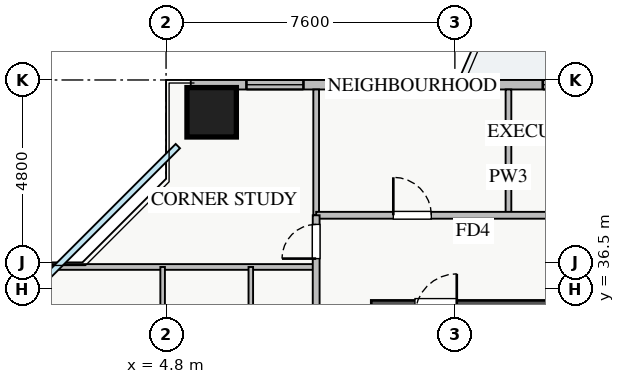
"""IFC4 building model, lengths in metres.
Left out: names, types, materials, properties, quantities, classifications, styles, units other than length and angle.
Written with IfcOpenShell. Run it as: python <this file> out.ifc"""

import sys

from ifc_helpers import new_model, si_unit, direction, frame, frame_2d, origin, origin_2d, place, context, subcontext, project, spatial, rectangle, extrude, source, transform, mapped, element, fill, save


model = new_model("IFC4")
c1 = context("Model", 3, precision=1e-05, world=origin(), true_north=direction((0.0, 1.0)))
c2 = subcontext(c1, "Body", "Model", "MODEL_VIEW")
j1 = project(units=[si_unit("LENGTHUNIT", "METRE"), si_unit("PLANEANGLEUNIT", "RADIAN")], contexts=[c1])
p1 = place(None, origin())
s1 = spatial("IfcSite", under=j1, at=p1, CompositionType="ELEMENT")
p2 = place(p1, origin())
s2 = spatial("IfcBuilding", under=s1, at=p2, CompositionType="ELEMENT")
p3 = place(p2, frame((0.0, 0.0, 60.0)))
s3 = spatial("IfcBuildingStorey", under=s2, at=p3, CompositionType="ELEMENT", Elevation=60.0)
p4 = place(p3, frame((10.2, 35.8, 0.0), z_axis=(0.0, 0.0, 1.0), x_axis=(1.0, 0.0, 0.0)))
e1 = element("IfcWall", 1, at=p4, inside=s3, PredefinedType="SHEAR", context=c2, shape_type="SweptSolid", body=[
    extrude(rectangle(XDim=17.6, YDim=0.8, at=frame_2d((8.8, 0.0))), origin(), (0.0, 0.0, 1.0), 3.25),
])
p5 = place(p4, frame((1.15, 0.0, 0.0)))
e2 = element("IfcOpeningElement", 2, at=p5, cuts=e1, PredefinedType="OPENING", context=c2, shape_type="SweptSolid", body=[
    extrude(rectangle(XDim=1.1, YDim=2.05, at=frame_2d((0.55, 1.025))), frame((0.0, 0.41, 0.0), z_axis=(0.0, -1.0, 0.0), x_axis=(1.0, 0.0, 0.0)), (0.0, 0.0, 1.0), 0.82),
])
p6 = place(p4, frame((8.3, 0.0, 0.0)))
e3 = element("IfcOpeningElement", 3, at=p6, cuts=e1, PredefinedType="OPENING", context=c2, shape_type="SweptSolid", body=[
    extrude(rectangle(XDim=1.1, YDim=2.05, at=frame_2d((0.55, 1.025))), frame((0.0, 0.41, 0.0), z_axis=(0.0, -1.0, 0.0), x_axis=(1.0, 0.0, 0.0)), (0.0, 0.0, 1.0), 0.82),
])
p7 = place(p4, frame((10.05, 0.0, 0.0)))
e4 = element("IfcOpeningElement", 4, at=p7, cuts=e1, PredefinedType="OPENING", context=c2, shape_type="SweptSolid", body=[
    extrude(rectangle(XDim=1.1, YDim=2.05, at=frame_2d((0.55, 1.025))), frame((0.0, 0.41, 0.0), z_axis=(0.0, -1.0, 0.0), x_axis=(1.0, 0.0, 0.0)), (0.0, 0.0, 1.0), 0.82),
])
p8 = place(p4, frame((14.74, 0.0, 0.0)))
e5 = element("IfcOpeningElement", 5, at=p8, cuts=e1, PredefinedType="OPENING", context=c2, shape_type="SweptSolid", body=[
    extrude(rectangle(XDim=1.0, YDim=2.05, at=frame_2d((0.5, 1.025))), frame((0.0, 0.41, 0.0), z_axis=(0.0, -1.0, 0.0), x_axis=(1.0, 0.0, 0.0)), (0.0, 0.0, 1.0), 0.82),
])
p9 = place(p4, frame((11.835, 0.0, 0.0)))
e6 = element("IfcOpeningElement", 6, at=p9, cuts=e1, PredefinedType="OPENING", context=c2, shape_type="SweptSolid", body=[
    extrude(rectangle(XDim=1.0, YDim=2.05, at=frame_2d((0.5, 1.025))), frame((0.0, 0.41, 0.0), z_axis=(0.0, -1.0, 0.0), x_axis=(1.0, 0.0, 0.0)), (0.0, 0.0, 1.0), 0.82),
])
p10 = place(p4, frame((13.37, 0.0, 0.0)))
e7 = element("IfcOpeningElement", 7, at=p10, cuts=e1, PredefinedType="OPENING", context=c2, shape_type="SweptSolid", body=[
    extrude(rectangle(XDim=1.0, YDim=2.05, at=frame_2d((0.5, 1.025))), frame((0.0, 0.41, 0.0), z_axis=(0.0, -1.0, 0.0), x_axis=(1.0, 0.0, 0.0)), (0.0, 0.0, 1.0), 0.82),
])
m1 = source(origin(), c2, "Body", "SweptSolid", [
    extrude(rectangle(XDim=1.3, YDim=1.3, at=origin_2d()), origin(), (0.0, 0.0, 1.0), 3.25),
])
p11 = place(p3, frame((6.0, 41.15, 0.0), z_axis=(0.0, 0.0, 1.0), x_axis=(1.0, 0.0, 0.0)))
e8 = element("IfcColumn", 8, at=p11, inside=s3, PredefinedType="COLUMN", context=c2, shape_type="MappedRepresentation", body=[
    mapped(m1, transform((0.0, 0.0, 0.0), x_axis=(1.0, 0.0, 0.0), y_axis=(0.0, 1.0, 0.0), z_axis=(0.0, 0.0, 1.0), scale=1.0)),
])
p12 = place(p3, frame((5.45, 41.875, 0.0), z_axis=(0.0, 0.0, 1.0), x_axis=(1.0, 0.0, 0.0)))
e9 = element("IfcWall", 9, at=p12, inside=s3, PredefinedType="STANDARD", context=c2, shape_type="SweptSolid", body=[
    extrude(rectangle(XDim=27.1, YDim=0.25, at=frame_2d((13.55, 0.0))), origin(), (0.0, 0.0, 1.0), 2.61),
])
p13 = place(p12, frame((14.4, 0.0, 0.0)))
e10 = element("IfcOpeningElement", 10, at=p13, cuts=e9, PredefinedType="OPENING", context=c2, shape_type="SweptSolid", body=[
    extrude(rectangle(XDim=1.2, YDim=2.1, at=frame_2d((0.6, 1.05))), frame((0.0, 0.135, 0.0), z_axis=(0.0, -1.0, 0.0), x_axis=(1.0, 0.0, 0.0)), (0.0, 0.0, 1.0), 0.27),
])
p14 = place(p12, frame((1.465, 0.0, 0.9)))
e11 = element("IfcOpeningElement", 11, at=p14, cuts=e9, PredefinedType="OPENING", context=c2, shape_type="SweptSolid", body=[
    extrude(rectangle(XDim=1.5, YDim=1.5, at=frame_2d((0.75, 0.75))), frame((0.0, 0.135, 0.0), z_axis=(0.0, -1.0, 0.0), x_axis=(1.0, 0.0, 0.0)), (0.0, 0.0, 1.0), 0.27),
])
p15 = place(p12, frame((9.263, 0.0, 0.9)))
e12 = element("IfcOpeningElement", 12, at=p15, cuts=e9, PredefinedType="OPENING", context=c2, shape_type="SweptSolid", body=[
    extrude(rectangle(XDim=1.8, YDim=1.45, at=frame_2d((0.9, 0.725))), frame((0.0, 0.135, 0.0), z_axis=(0.0, -1.0, 0.0), x_axis=(1.0, 0.0, 0.0)), (0.0, 0.0, 1.0), 0.27),
])
p16 = place(p12, frame((17.93, 0.0, 0.9)))
e13 = element("IfcOpeningElement", 13, at=p16, cuts=e9, PredefinedType="OPENING", context=c2, shape_type="SweptSolid", body=[
    extrude(rectangle(XDim=1.5, YDim=1.5, at=frame_2d((0.75, 0.75))), frame((0.0, 0.135, 0.0), z_axis=(0.0, -1.0, 0.0), x_axis=(1.0, 0.0, 0.0)), (0.0, 0.0, 1.0), 0.27),
])
p17 = place(p12, frame((22.663, 0.0, 0.9)))
e14 = element("IfcOpeningElement", 14, at=p17, cuts=e9, PredefinedType="OPENING", context=c2, shape_type="SweptSolid", body=[
    extrude(rectangle(XDim=2.1, YDim=1.48, at=frame_2d((1.05, 0.74))), frame((0.0, 0.135, 0.0), z_axis=(0.0, -1.0, 0.0), x_axis=(1.0, 0.0, 0.0)), (0.0, 0.0, 1.0), 0.27),
])
p18 = place(p12, frame((4.63, 0.0, 0.9)))
e15 = element("IfcOpeningElement", 15, at=p18, cuts=e9, PredefinedType="OPENING", context=c2, shape_type="SweptSolid", body=[
    extrude(rectangle(XDim=2.4, YDim=1.5, at=frame_2d((1.2, 0.75))), frame((0.0, 0.135, 0.0), z_axis=(0.0, -1.0, 0.0), x_axis=(1.0, 0.0, 0.0)), (0.0, 0.0, 1.0), 0.27),
])
for number, where, z_axis, x_axis in (
    (16, (13.81, 38.44, 0.0), (0.0, 0.0, 1.0), (0.0, 1.0, 0.0)),
    (17, (8.75, 38.44, 0.0), (0.0, 0.0, 1.0), (0.0, 1.0, 0.0)),
):
    element("IfcWall", number, at=place(p3, frame(where, z_axis=z_axis, x_axis=x_axis)), inside=s3, PredefinedType="PARTITIONING", context=c2, shape_type="SweptSolid", body=[
        extrude(rectangle(XDim=3.31, YDim=0.15, at=frame_2d((1.655, 0.0))), origin(), (0.0, 0.0, 1.0), 3.07),
    ])
p19 = place(p3, frame((8.75, 38.44, 0.0), z_axis=(0.0, 0.0, 1.0), x_axis=(1.0, 0.0, 0.0)))
e18 = element("IfcWall", 18, at=p19, inside=s3, PredefinedType="PARTITIONING", context=c2, shape_type="SweptSolid", body=[
    extrude(rectangle(XDim=23.61, YDim=0.18, at=frame_2d((11.805, 0.0))), origin(), (0.0, 0.0, 1.0), 3.07),
])
p20 = place(p19, frame((2.03, 0.0, 0.0)))
e19 = element("IfcOpeningElement", 19, at=p20, cuts=e18, PredefinedType="OPENING", context=c2, shape_type="SweptSolid", body=[
    extrude(rectangle(XDim=1.0, YDim=2.05, at=frame_2d((0.5, 1.025))), frame((0.0, 0.1, 0.0), z_axis=(0.0, -1.0, 0.0), x_axis=(1.0, 0.0, 0.0)), (0.0, 0.0, 1.0), 0.2),
])
p21 = place(p19, frame((8.555, 0.0, 0.0)))
e20 = element("IfcOpeningElement", 20, at=p21, cuts=e18, PredefinedType="OPENING", context=c2, shape_type="SweptSolid", body=[
    extrude(rectangle(XDim=1.0, YDim=2.05, at=frame_2d((0.5, 1.025))), frame((0.0, 0.1, 0.0), z_axis=(0.0, -1.0, 0.0), x_axis=(1.0, 0.0, 0.0)), (0.0, 0.0, 1.0), 0.2),
])
p22 = place(p19, frame((14.88, 0.0, 0.0)))
e21 = element("IfcOpeningElement", 21, at=p22, cuts=e18, PredefinedType="OPENING", context=c2, shape_type="SweptSolid", body=[
    extrude(rectangle(XDim=1.0, YDim=2.05, at=frame_2d((0.5, 1.025))), frame((0.0, 0.1, 0.0), z_axis=(0.0, -1.0, 0.0), x_axis=(1.0, 0.0, 0.0)), (0.0, 0.0, 1.0), 0.2),
])
p23 = place(p19, frame((20.16, 0.0, 0.0)))
e22 = element("IfcOpeningElement", 22, at=p23, cuts=e18, PredefinedType="OPENING", context=c2, shape_type="SweptSolid", body=[
    extrude(rectangle(XDim=1.0, YDim=2.05, at=frame_2d((0.5, 1.025))), frame((0.0, 0.1, 0.0), z_axis=(0.0, -1.0, 0.0), x_axis=(1.0, 0.0, 0.0)), (0.0, 0.0, 1.0), 0.2),
])
p24 = place(p3, frame((0.25, 37.08, 0.0), z_axis=(0.0, 0.0, 1.0), x_axis=(1.0, 0.0, 0.0)))
e23 = element("IfcWall", 23, at=p24, inside=s3, PredefinedType="PARTITIONING", context=c2, shape_type="SweptSolid", body=[
    extrude(rectangle(XDim=8.5, YDim=0.15, at=frame_2d((4.25, 0.0))), origin(), (0.0, 0.0, 1.0), 3.07),
])
for number, where, z_axis, x_axis in (
    (24, (4.71, 33.37, 0.0), (0.0, 0.0, 1.0), (0.0, 1.0, 0.0)),
    (25, (7.03, 33.37, 0.0), (0.0, 0.0, 1.0), (0.0, 1.0, 0.0)),
):
    element("IfcWall", number, at=place(p3, frame(where, z_axis=z_axis, x_axis=x_axis)), inside=s3, PredefinedType="PLUMBINGWALL", context=c2, shape_type="SweptSolid", body=[
        extrude(rectangle(XDim=3.71, YDim=0.12, at=frame_2d((1.855, 0.0))), origin(), (0.0, 0.0, 1.0), 3.07),
    ])
p25 = place(p3, frame((8.75, 7.21, 0.0), z_axis=(0.0, 0.0, 1.0), x_axis=(0.0, 1.0, 0.0)))
e26 = element("IfcWall", 26, at=p25, inside=s3, PredefinedType="PARTITIONING", context=c2, shape_type="SweptSolid", body=[
    extrude(rectangle(XDim=31.23, YDim=0.18, at=frame_2d((15.615, 0.0))), origin(), (0.0, 0.0, 1.0), 3.07),
])
p26 = place(p25, frame((30.09, 0.0, 0.0)))
e27 = element("IfcOpeningElement", 27, at=p26, cuts=e26, PredefinedType="OPENING", context=c2, shape_type="SweptSolid", body=[
    extrude(rectangle(XDim=0.9, YDim=2.05, at=frame_2d((0.45, 1.025))), frame((0.0, 0.1, 0.0), z_axis=(0.0, -1.0, 0.0), x_axis=(1.0, 0.0, 0.0)), (0.0, 0.0, 1.0), 0.2),
])
p27 = place(p25, frame((0.24, 0.0, 0.0)))
e28 = element("IfcOpeningElement", 28, at=p27, cuts=e26, PredefinedType="OPENING", context=c2, shape_type="SweptSolid", body=[
    extrude(rectangle(XDim=0.9, YDim=2.05, at=frame_2d((0.45, 1.025))), frame((0.0, 0.1, 0.0), z_axis=(0.0, -1.0, 0.0), x_axis=(1.0, 0.0, 0.0)), (0.0, 0.0, 1.0), 0.2),
])
p28 = place(p25, frame((2.555, 0.0, 0.0)))
e29 = element("IfcOpeningElement", 29, at=p28, cuts=e26, PredefinedType="OPENING", context=c2, shape_type="SweptSolid", body=[
    extrude(rectangle(XDim=1.0, YDim=2.05, at=frame_2d((0.5, 1.025))), frame((0.0, 0.1, 0.0), z_axis=(0.0, -1.0, 0.0), x_axis=(1.0, 0.0, 0.0)), (0.0, 0.0, 1.0), 0.2),
])
p29 = place(p25, frame((11.91, 0.0, 0.0)))
e30 = element("IfcOpeningElement", 30, at=p29, cuts=e26, PredefinedType="OPENING", context=c2, shape_type="SweptSolid", body=[
    extrude(rectangle(XDim=1.0, YDim=2.05, at=frame_2d((0.5, 1.025))), frame((0.0, 0.1, 0.0), z_axis=(0.0, -1.0, 0.0), x_axis=(1.0, 0.0, 0.0)), (0.0, 0.0, 1.0), 0.2),
])
p30 = place(p25, frame((17.425, 0.0, 0.0)))
e31 = element("IfcOpeningElement", 31, at=p30, cuts=e26, PredefinedType="OPENING", context=c2, shape_type="SweptSolid", body=[
    extrude(rectangle(XDim=1.0, YDim=2.05, at=frame_2d((0.5, 1.025))), frame((0.0, 0.1, 0.0), z_axis=(0.0, -1.0, 0.0), x_axis=(1.0, 0.0, 0.0)), (0.0, 0.0, 1.0), 0.2),
])
p31 = place(p25, frame((23.76, 0.0, 0.0)))
e32 = element("IfcOpeningElement", 32, at=p31, cuts=e26, PredefinedType="OPENING", context=c2, shape_type="SweptSolid", body=[
    extrude(rectangle(XDim=1.0, YDim=2.05, at=frame_2d((0.5, 1.025))), frame((0.0, 0.1, 0.0), z_axis=(0.0, -1.0, 0.0), x_axis=(1.0, 0.0, 0.0)), (0.0, 0.0, 1.0), 0.2),
])
m2 = source(origin(), c2, "Body", "SweptSolid", [
    extrude(rectangle(XDim=1.5, YDim=1.5, at=frame_2d((0.75, 0.75))), frame((0.0, 0.03, 0.0), z_axis=(0.0, -1.0, 0.0), x_axis=(1.0, 0.0, 0.0)), (0.0, 0.0, 1.0), 0.06),
])
p32 = place(p14, origin())
e33 = element("IfcWindow", 33, at=p32, inside=s3, PartitioningType="TRIPLE_PANEL_VERTICAL", PredefinedType="WINDOW", context=c2, shape_type="MappedRepresentation", body=[
    mapped(m2, transform((0.0, 0.0, 0.0), x_axis=(1.0, 0.0, 0.0), y_axis=(0.0, 1.0, 0.0), z_axis=(0.0, 0.0, 1.0), scale=1.0)),
])
fill(e11, e33)
m3 = source(origin(), c2, "Body", "SweptSolid", [
    extrude(rectangle(XDim=1.8, YDim=1.45, at=frame_2d((0.9, 0.725))), frame((0.0, 0.03, 0.0), z_axis=(0.0, -1.0, 0.0), x_axis=(1.0, 0.0, 0.0)), (0.0, 0.0, 1.0), 0.06),
])
p33 = place(p15, origin())
e34 = element("IfcWindow", 34, at=p33, inside=s3, PartitioningType="DOUBLE_PANEL_VERTICAL", PredefinedType="WINDOW", context=c2, shape_type="MappedRepresentation", body=[
    mapped(m3, transform((0.0, 0.0, 0.0), x_axis=(1.0, 0.0, 0.0), y_axis=(0.0, 1.0, 0.0), z_axis=(0.0, 0.0, 1.0), scale=1.0)),
])
fill(e12, e34)
m4 = source(origin(), c2, "Body", "SweptSolid", [
    extrude(rectangle(XDim=1.0, YDim=2.05, at=frame_2d((0.5, 1.025))), frame((0.0, 0.025, 0.0), z_axis=(0.0, -1.0, 0.0), x_axis=(1.0, 0.0, 0.0)), (0.0, 0.0, 1.0), 0.05),
])
p34 = place(p20, origin())
e35 = element("IfcDoor", 35, at=p34, inside=s3, OperationType="SINGLE_SWING_LEFT", PredefinedType="DOOR", context=c2, shape_type="MappedRepresentation", body=[
    mapped(m4, transform((0.0, 0.0, 0.0), x_axis=(1.0, 0.0, 0.0), y_axis=(0.0, 1.0, 0.0), z_axis=(0.0, 0.0, 1.0), scale=1.0)),
])
fill(e19, e35)
m5 = source(origin(), c2, "Body", "SweptSolid", [
    extrude(rectangle(XDim=0.9, YDim=2.05, at=frame_2d((0.45, 1.025))), frame((0.0, 0.025, 0.0), z_axis=(0.0, -1.0, 0.0), x_axis=(1.0, 0.0, 0.0)), (0.0, 0.0, 1.0), 0.05),
])
p35 = place(p26, origin())
e36 = element("IfcDoor", 36, at=p35, inside=s3, OperationType="SINGLE_SWING_LEFT", PredefinedType="DOOR", context=c2, shape_type="MappedRepresentation", body=[
    mapped(m5, transform((0.0, 0.0, 0.0), x_axis=(1.0, 0.0, 0.0), y_axis=(0.0, 1.0, 0.0), z_axis=(0.0, 0.0, 1.0), scale=1.0)),
])
fill(e27, e36)
m6 = source(origin(), c2, "Body", "SweptSolid", [
    extrude(rectangle(XDim=2.4, YDim=1.5, at=frame_2d((1.2, 0.75))), frame((0.0, 0.03, 0.0), z_axis=(0.0, -1.0, 0.0), x_axis=(1.0, 0.0, 0.0)), (0.0, 0.0, 1.0), 0.06),
])
p36 = place(p18, origin())
e37 = element("IfcWindow", 37, at=p36, inside=s3, PartitioningType="TRIPLE_PANEL_VERTICAL", PredefinedType="WINDOW", context=c2, shape_type="MappedRepresentation", body=[
    mapped(m6, transform((0.0, 0.0, 0.0), x_axis=(1.0, 0.0, 0.0), y_axis=(0.0, 1.0, 0.0), z_axis=(0.0, 0.0, 1.0), scale=1.0)),
])
fill(e15, e37)
save(model, sys.argv[1])
